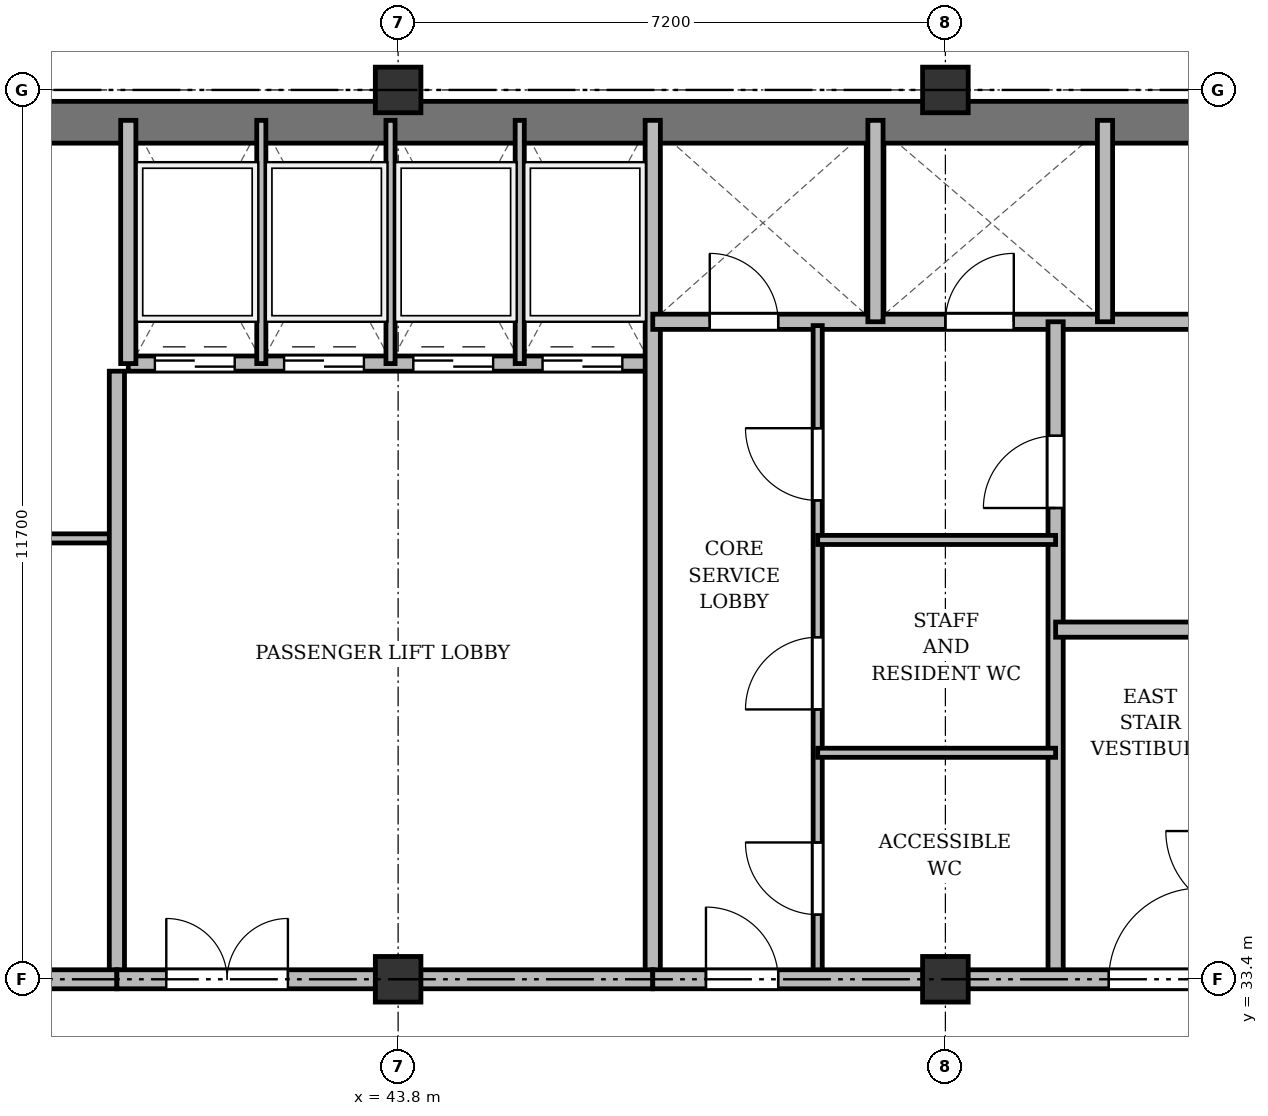
"""IFC4 building model, lengths in metres.
Left out: names, types, materials, properties, quantities, classifications, styles, units other than length and angle.
Written with IfcOpenShell. Run it as: python <this file> out.ifc"""

import sys

from ifc_helpers import new_model, si_unit, direction, frame, frame_2d, origin, origin_2d, place, context, subcontext, project, spatial, rectangle, extrude, source, transform, mapped, element, fill, save


model = new_model("IFC4")
c1 = context("Model", 3, precision=1e-05, world=origin(), true_north=direction((0.0, 1.0)))
c2 = subcontext(c1, "Body", "Model", "MODEL_VIEW")
j1 = project(units=[si_unit("LENGTHUNIT", "METRE"), si_unit("PLANEANGLEUNIT", "RADIAN")], contexts=[c1])
p1 = place(None, origin())
s1 = spatial("IfcSite", under=j1, at=p1, CompositionType="ELEMENT")
p2 = place(p1, origin())
s2 = spatial("IfcBuilding", under=s1, at=p2, CompositionType="ELEMENT")
p3 = place(p2, frame((0.0, 0.0, 255.9)))
s3 = spatial("IfcBuildingStorey", under=s2, at=p3, CompositionType="ELEMENT", Elevation=255.9)
m1 = source(origin(), c2, "Body", "SweptSolid", [
    extrude(rectangle(XDim=0.6, YDim=0.6, at=origin_2d()), origin(), (0.0, 0.0, 1.0), 3.6),
])
for number, where, z_axis, x_axis in (
    (1, (43.8, 33.4, 0.0), (0.0, 0.0, 1.0), (1.0, 0.0, 0.0)),
    (2, (43.8, 45.1, 0.0), (0.0, 0.0, 1.0), (1.0, 0.0, 0.0)),
    (3, (51.0, 33.4, 0.0), (0.0, 0.0, 1.0), (1.0, 0.0, 0.0)),
    (4, (51.0, 45.1, 0.0), (0.0, 0.0, 1.0), (1.0, 0.0, 0.0)),
):
    element("IfcColumn", number, at=place(p3, frame(where, z_axis=z_axis, x_axis=x_axis)), inside=s3, PredefinedType="COLUMN", context=c2, shape_type="MappedRepresentation", body=[
        mapped(m1, transform((0.0, 0.0, 0.0), x_axis=(1.0, 0.0, 0.0), y_axis=(0.0, 1.0, 0.0), z_axis=(0.0, 0.0, 1.0), scale=1.0)),
    ])
p4 = place(p3, frame((15.65, 44.675, 0.0), z_axis=(0.0, 0.0, 1.0), x_axis=(1.0, 0.0, 0.0)))
e5 = element("IfcWall", 5, at=p4, inside=s3, PredefinedType="SHEAR", context=c2, shape_type="SweptSolid", body=[
    extrude(rectangle(XDim=43.1, YDim=0.55, at=frame_2d((21.55, 0.0))), origin(), (0.0, 0.0, 1.0), 3.37),
])
p5 = place(p3, frame((33.3, 39.2, 0.0), z_axis=(0.0, 0.0, 1.0), x_axis=(1.0, 0.0, 0.0)))
e6 = element("IfcWall", 6, at=p5, inside=s3, PredefinedType="PARTITIONING", context=c2, shape_type="SweptSolid", body=[
    extrude(rectangle(XDim=6.8, YDim=0.12, at=frame_2d((3.4, 0.0))), origin(), (0.0, 0.0, 1.0), 3.37),
])
p6 = place(p5, frame((2.6, 0.0, 0.0)))
e7 = element("IfcOpeningElement", 7, at=p6, cuts=e6, PredefinedType="OPENING", context=c2, shape_type="SweptSolid", body=[
    extrude(rectangle(XDim=0.95, YDim=2.15, at=frame_2d((0.475, 1.075))), frame((0.0, 0.07, 0.0), z_axis=(0.0, -1.0, 0.0), x_axis=(1.0, 0.0, 0.0)), (0.0, 0.0, 1.0), 0.14),
])
p7 = place(p3, frame((40.1, 33.4, 0.0), z_axis=(0.0, 0.0, 1.0), x_axis=(0.0, 1.0, 0.0)))
e8 = element("IfcWall", 8, at=p7, inside=s3, PredefinedType="SOLIDWALL", context=c2, shape_type="SweptSolid", body=[
    extrude(rectangle(XDim=8.0, YDim=0.2, at=frame_2d((4.0, 0.0))), origin(), (0.0, 0.0, 1.0), 2.92),
])
p8 = place(p3, frame((40.25, 41.5, 0.0), z_axis=(0.0, 0.0, 1.0), x_axis=(1.0, 0.0, 0.0)))
e9 = element("IfcWall", 9, at=p8, inside=s3, PredefinedType="SOLIDWALL", context=c2, shape_type="SweptSolid", body=[
    extrude(rectangle(XDim=6.9, YDim=0.2, at=frame_2d((3.45, 0.0))), origin(), (0.0, 0.0, 1.0), 3.37),
])
p9 = place(p8, frame((0.35, 0.0, 0.0)))
e10 = element("IfcOpeningElement", 10, at=p9, cuts=e9, PredefinedType="OPENING", context=c2, shape_type="SweptSolid", body=[
    extrude(rectangle(XDim=1.05, YDim=2.15, at=frame_2d((0.525, 1.075))), frame((0.0, 0.11, 0.0), z_axis=(0.0, -1.0, 0.0), x_axis=(1.0, 0.0, 0.0)), (0.0, 0.0, 1.0), 0.22),
])
p10 = place(p8, frame((2.05, 0.0, 0.0)))
e11 = element("IfcOpeningElement", 11, at=p10, cuts=e9, PredefinedType="OPENING", context=c2, shape_type="SweptSolid", body=[
    extrude(rectangle(XDim=1.05, YDim=2.15, at=frame_2d((0.525, 1.075))), frame((0.0, 0.11, 0.0), z_axis=(0.0, -1.0, 0.0), x_axis=(1.0, 0.0, 0.0)), (0.0, 0.0, 1.0), 0.22),
])
p11 = place(p8, frame((3.75, 0.0, 0.0)))
e12 = element("IfcOpeningElement", 12, at=p11, cuts=e9, PredefinedType="OPENING", context=c2, shape_type="SweptSolid", body=[
    extrude(rectangle(XDim=1.05, YDim=2.15, at=frame_2d((0.525, 1.075))), frame((0.0, 0.11, 0.0), z_axis=(0.0, -1.0, 0.0), x_axis=(1.0, 0.0, 0.0)), (0.0, 0.0, 1.0), 0.22),
])
p12 = place(p8, frame((5.45, 0.0, 0.0)))
e13 = element("IfcOpeningElement", 13, at=p12, cuts=e9, PredefinedType="OPENING", context=c2, shape_type="SweptSolid", body=[
    extrude(rectangle(XDim=1.05, YDim=2.15, at=frame_2d((0.525, 1.075))), frame((0.0, 0.11, 0.0), z_axis=(0.0, -1.0, 0.0), x_axis=(1.0, 0.0, 0.0)), (0.0, 0.0, 1.0), 0.22),
])
p13 = place(p3, frame((40.25, 41.5, 0.0), z_axis=(0.0, 0.0, 1.0), x_axis=(0.0, 1.0, 0.0)))
e14 = element("IfcWall", 14, at=p13, inside=s3, PredefinedType="SOLIDWALL", context=c2, shape_type="SweptSolid", body=[
    extrude(rectangle(XDim=3.2, YDim=0.2, at=frame_2d((1.6, 0.0))), origin(), (0.0, 0.0, 1.0), 3.37),
])
for number, where, z_axis, x_axis in (
    (15, (42.0, 41.5, 0.0), (0.0, 0.0, 1.0), (0.0, 1.0, 0.0)),
    (16, (43.7, 41.5, 0.0), (0.0, 0.0, 1.0), (0.0, 1.0, 0.0)),
    (17, (45.4, 41.5, 0.0), (0.0, 0.0, 1.0), (0.0, 1.0, 0.0)),
):
    element("IfcWall", number, at=place(p3, frame(where, z_axis=z_axis, x_axis=x_axis)), inside=s3, PredefinedType="PARTITIONING", context=c2, shape_type="SweptSolid", body=[
        extrude(rectangle(XDim=3.2, YDim=0.12, at=frame_2d((1.6, 0.0))), origin(), (0.0, 0.0, 1.0), 3.37),
    ])
p14 = place(p3, frame((47.15, 33.4, 0.0), z_axis=(0.0, 0.0, 1.0), x_axis=(0.0, 1.0, 0.0)))
e18 = element("IfcWall", 18, at=p14, inside=s3, PredefinedType="SOLIDWALL", context=c2, shape_type="SweptSolid", body=[
    extrude(rectangle(XDim=11.3, YDim=0.2, at=frame_2d((5.65, 0.0))), origin(), (0.0, 0.0, 1.0), 2.92),
])
p15 = place(p3, frame((33.3, 33.4, 0.0), z_axis=(0.0, 0.0, 1.0), x_axis=(1.0, 0.0, 0.0)))
e19 = element("IfcWall", 19, at=p15, inside=s3, PredefinedType="PARTITIONING", context=c2, shape_type="SweptSolid", body=[
    extrude(rectangle(XDim=6.8, YDim=0.25, at=frame_2d((3.4, 0.0))), origin(), (0.0, 0.0, 1.0), 2.92),
])
p16 = place(p15, frame((2.4, 0.0, 0.0)))
e20 = element("IfcOpeningElement", 20, at=p16, cuts=e19, PredefinedType="OPENING", context=c2, shape_type="SweptSolid", body=[
    extrude(rectangle(XDim=1.0, YDim=2.15, at=frame_2d((0.5, 1.075))), frame((0.0, 0.135, 0.0), z_axis=(0.0, -1.0, 0.0), x_axis=(1.0, 0.0, 0.0)), (0.0, 0.0, 1.0), 0.27),
])
p17 = place(p3, frame((40.1, 33.4, 0.0), z_axis=(0.0, 0.0, 1.0), x_axis=(1.0, 0.0, 0.0)))
e21 = element("IfcWall", 21, at=p17, inside=s3, PredefinedType="PARTITIONING", context=c2, shape_type="SweptSolid", body=[
    extrude(rectangle(XDim=7.05, YDim=0.25, at=frame_2d((3.525, 0.0))), origin(), (0.0, 0.0, 1.0), 2.92),
])
p18 = place(p17, frame((0.65, 0.0, 0.0)))
e22 = element("IfcOpeningElement", 22, at=p18, cuts=e21, PredefinedType="OPENING", context=c2, shape_type="SweptSolid", body=[
    extrude(rectangle(XDim=1.6, YDim=2.2, at=frame_2d((0.8, 1.1))), frame((0.0, 0.135, 0.0), z_axis=(0.0, -1.0, 0.0), x_axis=(1.0, 0.0, 0.0)), (0.0, 0.0, 1.0), 0.27),
])
p19 = place(p3, frame((47.15, 42.05, 0.0), z_axis=(0.0, 0.0, 1.0), x_axis=(1.0, 0.0, 0.0)))
e23 = element("IfcWall", 23, at=p19, inside=s3, PredefinedType="SOLIDWALL", context=c2, shape_type="SweptSolid", body=[
    extrude(rectangle(XDim=7.85, YDim=0.2, at=frame_2d((3.925, 0.0))), origin(), (0.0, 0.0, 1.0), 2.87),
])
p20 = place(p19, frame((0.75, 0.0, 0.0)))
e24 = element("IfcOpeningElement", 24, at=p20, cuts=e23, PredefinedType="OPENING", context=c2, shape_type="SweptSolid", body=[
    extrude(rectangle(XDim=0.9, YDim=2.1, at=frame_2d((0.45, 1.05))), frame((0.0, 0.11, 0.0), z_axis=(0.0, -1.0, 0.0), x_axis=(1.0, 0.0, 0.0)), (0.0, 0.0, 1.0), 0.22),
])
p21 = place(p19, frame((3.85, 0.0, 0.0)))
e25 = element("IfcOpeningElement", 25, at=p21, cuts=e23, PredefinedType="OPENING", context=c2, shape_type="SweptSolid", body=[
    extrude(rectangle(XDim=0.9, YDim=2.1, at=frame_2d((0.45, 1.05))), frame((0.0, 0.11, 0.0), z_axis=(0.0, -1.0, 0.0), x_axis=(1.0, 0.0, 0.0)), (0.0, 0.0, 1.0), 0.22),
])
for number, where, z_axis, x_axis in (
    (26, (50.08, 42.05, 0.0), (0.0, 0.0, 1.0), (0.0, 1.0, 0.0)),
    (27, (53.1, 42.05, 0.0), (0.0, 0.0, 1.0), (0.0, 1.0, 0.0)),
):
    element("IfcWall", number, at=place(p3, frame(where, z_axis=z_axis, x_axis=x_axis)), inside=s3, PredefinedType="SOLIDWALL", context=c2, shape_type="SweptSolid", body=[
        extrude(rectangle(XDim=2.65, YDim=0.2, at=frame_2d((1.325, 0.0))), origin(), (0.0, 0.0, 1.0), 3.37),
    ])
p22 = place(p3, frame((52.45, 33.4, 0.0), z_axis=(0.0, 0.0, 1.0), x_axis=(0.0, 1.0, 0.0)))
e28 = element("IfcWall", 28, at=p22, inside=s3, PredefinedType="PARTITIONING", context=c2, shape_type="SweptSolid", body=[
    extrude(rectangle(XDim=8.65, YDim=0.2, at=frame_2d((4.325, 0.0))), origin(), (0.0, 0.0, 1.0), 2.92),
])
p23 = place(p22, frame((6.2, 0.0, 0.0)))
e29 = element("IfcOpeningElement", 29, at=p23, cuts=e28, PredefinedType="OPENING", context=c2, shape_type="SweptSolid", body=[
    extrude(rectangle(XDim=0.95, YDim=2.15, at=frame_2d((0.475, 1.075))), frame((0.0, 0.11, 0.0), z_axis=(0.0, -1.0, 0.0), x_axis=(1.0, 0.0, 0.0)), (0.0, 0.0, 1.0), 0.22),
])
p24 = place(p3, frame((52.45, 38.0, 0.0), z_axis=(0.0, 0.0, 1.0), x_axis=(1.0, 0.0, 0.0)))
e30 = element("IfcWall", 30, at=p24, inside=s3, PredefinedType="PARTITIONING", context=c2, shape_type="SweptSolid", body=[
    extrude(rectangle(XDim=2.55, YDim=0.2, at=frame_2d((1.275, 0.0))), origin(), (0.0, 0.0, 1.0), 3.37),
])
p25 = place(p3, frame((49.32, 33.4, 0.0), z_axis=(0.0, 0.0, 1.0), x_axis=(0.0, 1.0, 0.0)))
e31 = element("IfcWall", 31, at=p25, inside=s3, PredefinedType="PARTITIONING", context=c2, shape_type="SweptSolid", body=[
    extrude(rectangle(XDim=8.6, YDim=0.12, at=frame_2d((4.3, 0.0))), origin(), (0.0, 0.0, 1.0), 2.92),
])
p26 = place(p25, frame((0.85, 0.0, 0.0)))
e32 = element("IfcOpeningElement", 32, at=p26, cuts=e31, PredefinedType="OPENING", context=c2, shape_type="SweptSolid", body=[
    extrude(rectangle(XDim=0.95, YDim=2.15, at=frame_2d((0.475, 1.075))), frame((0.0, 0.07, 0.0), z_axis=(0.0, -1.0, 0.0), x_axis=(1.0, 0.0, 0.0)), (0.0, 0.0, 1.0), 0.14),
])
p27 = place(p25, frame((3.55, 0.0, 0.0)))
e33 = element("IfcOpeningElement", 33, at=p27, cuts=e31, PredefinedType="OPENING", context=c2, shape_type="SweptSolid", body=[
    extrude(rectangle(XDim=0.95, YDim=2.15, at=frame_2d((0.475, 1.075))), frame((0.0, 0.07, 0.0), z_axis=(0.0, -1.0, 0.0), x_axis=(1.0, 0.0, 0.0)), (0.0, 0.0, 1.0), 0.14),
])
p28 = place(p25, frame((6.3, 0.0, 0.0)))
e34 = element("IfcOpeningElement", 34, at=p28, cuts=e31, PredefinedType="OPENING", context=c2, shape_type="SweptSolid", body=[
    extrude(rectangle(XDim=0.95, YDim=2.15, at=frame_2d((0.475, 1.075))), frame((0.0, 0.07, 0.0), z_axis=(0.0, -1.0, 0.0), x_axis=(1.0, 0.0, 0.0)), (0.0, 0.0, 1.0), 0.14),
])
for number, where, z_axis, x_axis in (
    (35, (49.32, 36.38, 0.0), (0.0, 0.0, 1.0), (1.0, 0.0, 0.0)),
    (36, (49.32, 39.18, 0.0), (0.0, 0.0, 1.0), (1.0, 0.0, 0.0)),
):
    element("IfcWall", number, at=place(p3, frame(where, z_axis=z_axis, x_axis=x_axis)), inside=s3, PredefinedType="PARTITIONING", context=c2, shape_type="SweptSolid", body=[
        extrude(rectangle(XDim=3.13, YDim=0.12, at=frame_2d((1.565, 0.0))), origin(), (0.0, 0.0, 1.0), 2.87),
    ])
p29 = place(p3, frame((47.15, 33.4, 0.0), z_axis=(0.0, 0.0, 1.0), x_axis=(1.0, 0.0, 0.0)))
e37 = element("IfcWall", 37, at=p29, inside=s3, PredefinedType="PARTITIONING", context=c2, shape_type="SweptSolid", body=[
    extrude(rectangle(XDim=11.15, YDim=0.25, at=frame_2d((5.575, 0.0))), origin(), (0.0, 0.0, 1.0), 2.92),
])
p30 = place(p29, frame((0.7, 0.0, 0.0)))
e38 = element("IfcOpeningElement", 38, at=p30, cuts=e37, PredefinedType="OPENING", context=c2, shape_type="SweptSolid", body=[
    extrude(rectangle(XDim=0.95, YDim=2.15, at=frame_2d((0.475, 1.075))), frame((0.0, 0.135, 0.0), z_axis=(0.0, -1.0, 0.0), x_axis=(1.0, 0.0, 0.0)), (0.0, 0.0, 1.0), 0.27),
])
p31 = place(p29, frame((6.0, 0.0, 0.0)))
e39 = element("IfcOpeningElement", 39, at=p31, cuts=e37, PredefinedType="OPENING", context=c2, shape_type="SweptSolid", body=[
    extrude(rectangle(XDim=1.2, YDim=2.15, at=frame_2d((0.6, 1.075))), frame((0.0, 0.135, 0.0), z_axis=(0.0, -1.0, 0.0), x_axis=(1.0, 0.0, 0.0)), (0.0, 0.0, 1.0), 0.27),
])
m2 = source(origin(), c2, "Body", "SweptSolid", [
    extrude(rectangle(XDim=1.05, YDim=2.15, at=frame_2d((0.525, 1.075))), frame((0.0, 0.025, 0.0), z_axis=(0.0, -1.0, 0.0), x_axis=(1.0, 0.0, 0.0)), (0.0, 0.0, 1.0), 0.05),
])
p32 = place(p9, origin())
e40 = element("IfcDoor", 40, at=p32, inside=s3, OperationType="DOUBLE_DOOR_SLIDING", PredefinedType="DOOR", context=c2, shape_type="MappedRepresentation", body=[
    mapped(m2, transform((0.0, 0.0, 0.0), x_axis=(1.0, 0.0, 0.0), y_axis=(0.0, 1.0, 0.0), z_axis=(0.0, 0.0, 1.0), scale=1.0)),
])
fill(e10, e40)
p33 = place(p10, origin())
e41 = element("IfcDoor", 41, at=p33, inside=s3, OperationType="DOUBLE_DOOR_SLIDING", PredefinedType="DOOR", context=c2, shape_type="MappedRepresentation", body=[
    mapped(m2, transform((0.0, 0.0, 0.0), x_axis=(1.0, 0.0, 0.0), y_axis=(0.0, 1.0, 0.0), z_axis=(0.0, 0.0, 1.0), scale=1.0)),
])
fill(e11, e41)
p34 = place(p11, origin())
e42 = element("IfcDoor", 42, at=p34, inside=s3, OperationType="DOUBLE_DOOR_SLIDING", PredefinedType="DOOR", context=c2, shape_type="MappedRepresentation", body=[
    mapped(m2, transform((0.0, 0.0, 0.0), x_axis=(1.0, 0.0, 0.0), y_axis=(0.0, 1.0, 0.0), z_axis=(0.0, 0.0, 1.0), scale=1.0)),
])
fill(e12, e42)
p35 = place(p12, origin())
e43 = element("IfcDoor", 43, at=p35, inside=s3, OperationType="DOUBLE_DOOR_SLIDING", PredefinedType="DOOR", context=c2, shape_type="MappedRepresentation", body=[
    mapped(m2, transform((0.0, 0.0, 0.0), x_axis=(1.0, 0.0, 0.0), y_axis=(0.0, 1.0, 0.0), z_axis=(0.0, 0.0, 1.0), scale=1.0)),
])
fill(e13, e43)
m3 = source(origin(), c2, "Body", "SweptSolid", [
    extrude(rectangle(XDim=1.6, YDim=2.2, at=frame_2d((0.8, 1.1))), frame((0.0, 0.025, 0.0), z_axis=(0.0, -1.0, 0.0), x_axis=(1.0, 0.0, 0.0)), (0.0, 0.0, 1.0), 0.05),
])
p36 = place(p18, origin())
e44 = element("IfcDoor", 44, at=p36, inside=s3, OperationType="DOUBLE_DOOR_SINGLE_SWING", PredefinedType="DOOR", context=c2, shape_type="MappedRepresentation", body=[
    mapped(m3, transform((0.0, 0.0, 0.0), x_axis=(1.0, 0.0, 0.0), y_axis=(0.0, 1.0, 0.0), z_axis=(0.0, 0.0, 1.0), scale=1.0)),
])
fill(e22, e44)
m4 = source(origin(), c2, "Body", "SweptSolid", [
    extrude(rectangle(XDim=0.9, YDim=2.1, at=frame_2d((0.45, 1.05))), frame((0.0, 0.025, 0.0), z_axis=(0.0, -1.0, 0.0), x_axis=(1.0, 0.0, 0.0)), (0.0, 0.0, 1.0), 0.05),
])
p37 = place(p20, origin())
e45 = element("IfcDoor", 45, at=p37, inside=s3, OperationType="SINGLE_SWING_LEFT", PredefinedType="DOOR", context=c2, shape_type="MappedRepresentation", body=[
    mapped(m4, transform((0.0, 0.0, 0.0), x_axis=(1.0, 0.0, 0.0), y_axis=(0.0, 1.0, 0.0), z_axis=(0.0, 0.0, 1.0), scale=1.0)),
])
fill(e24, e45)
p38 = place(p21, origin())
e46 = element("IfcDoor", 46, at=p38, inside=s3, OperationType="SINGLE_SWING_RIGHT", PredefinedType="DOOR", context=c2, shape_type="MappedRepresentation", body=[
    mapped(m4, transform((0.0, 0.0, 0.0), x_axis=(1.0, 0.0, 0.0), y_axis=(0.0, 1.0, 0.0), z_axis=(0.0, 0.0, 1.0), scale=1.0)),
])
fill(e25, e46)
m5 = source(origin(), c2, "Body", "SweptSolid", [
    extrude(rectangle(XDim=0.95, YDim=2.15, at=frame_2d((0.475, 1.075))), frame((0.0, 0.025, 0.0), z_axis=(0.0, -1.0, 0.0), x_axis=(1.0, 0.0, 0.0)), (0.0, 0.0, 1.0), 0.05),
])
p39 = place(p23, origin())
e47 = element("IfcDoor", 47, at=p39, inside=s3, OperationType="SINGLE_SWING_LEFT", PredefinedType="DOOR", context=c2, shape_type="MappedRepresentation", body=[
    mapped(m5, transform((0.0, 0.0, 0.0), x_axis=(1.0, 0.0, 0.0), y_axis=(0.0, 1.0, 0.0), z_axis=(0.0, 0.0, 1.0), scale=1.0)),
])
fill(e29, e47)
p40 = place(p26, origin())
e48 = element("IfcDoor", 48, at=p40, inside=s3, OperationType="SINGLE_SWING_RIGHT", PredefinedType="DOOR", context=c2, shape_type="MappedRepresentation", body=[
    mapped(m5, transform((0.0, 0.0, 0.0), x_axis=(1.0, 0.0, 0.0), y_axis=(0.0, 1.0, 0.0), z_axis=(0.0, 0.0, 1.0), scale=1.0)),
])
fill(e32, e48)
p41 = place(p27, origin())
e49 = element("IfcDoor", 49, at=p41, inside=s3, OperationType="SINGLE_SWING_LEFT", PredefinedType="DOOR", context=c2, shape_type="MappedRepresentation", body=[
    mapped(m5, transform((0.0, 0.0, 0.0), x_axis=(1.0, 0.0, 0.0), y_axis=(0.0, 1.0, 0.0), z_axis=(0.0, 0.0, 1.0), scale=1.0)),
])
fill(e33, e49)
p42 = place(p28, origin())
e50 = element("IfcDoor", 50, at=p42, inside=s3, OperationType="SINGLE_SWING_RIGHT", PredefinedType="DOOR", context=c2, shape_type="MappedRepresentation", body=[
    mapped(m5, transform((0.0, 0.0, 0.0), x_axis=(1.0, 0.0, 0.0), y_axis=(0.0, 1.0, 0.0), z_axis=(0.0, 0.0, 1.0), scale=1.0)),
])
fill(e34, e50)
p43 = place(p30, origin())
e51 = element("IfcDoor", 51, at=p43, inside=s3, OperationType="SINGLE_SWING_LEFT", PredefinedType="DOOR", context=c2, shape_type="MappedRepresentation", body=[
    mapped(m5, transform((0.0, 0.0, 0.0), x_axis=(1.0, 0.0, 0.0), y_axis=(0.0, 1.0, 0.0), z_axis=(0.0, 0.0, 1.0), scale=1.0)),
])
fill(e38, e51)
m6 = source(origin(), c2, "Body", "SweptSolid", [
    extrude(rectangle(XDim=1.2, YDim=2.15, at=frame_2d((0.6, 1.075))), frame((0.0, 0.025, 0.0), z_axis=(0.0, -1.0, 0.0), x_axis=(1.0, 0.0, 0.0)), (0.0, 0.0, 1.0), 0.05),
])
p44 = place(p31, origin())
e52 = element("IfcDoor", 52, at=p44, inside=s3, OperationType="SINGLE_SWING_RIGHT", PredefinedType="DOOR", context=c2, shape_type="MappedRepresentation", body=[
    mapped(m6, transform((0.0, 0.0, 0.0), x_axis=(1.0, 0.0, 0.0), y_axis=(0.0, 1.0, 0.0), z_axis=(0.0, 0.0, 1.0), scale=1.0)),
])
fill(e39, e52)
save(model, sys.argv[1])
